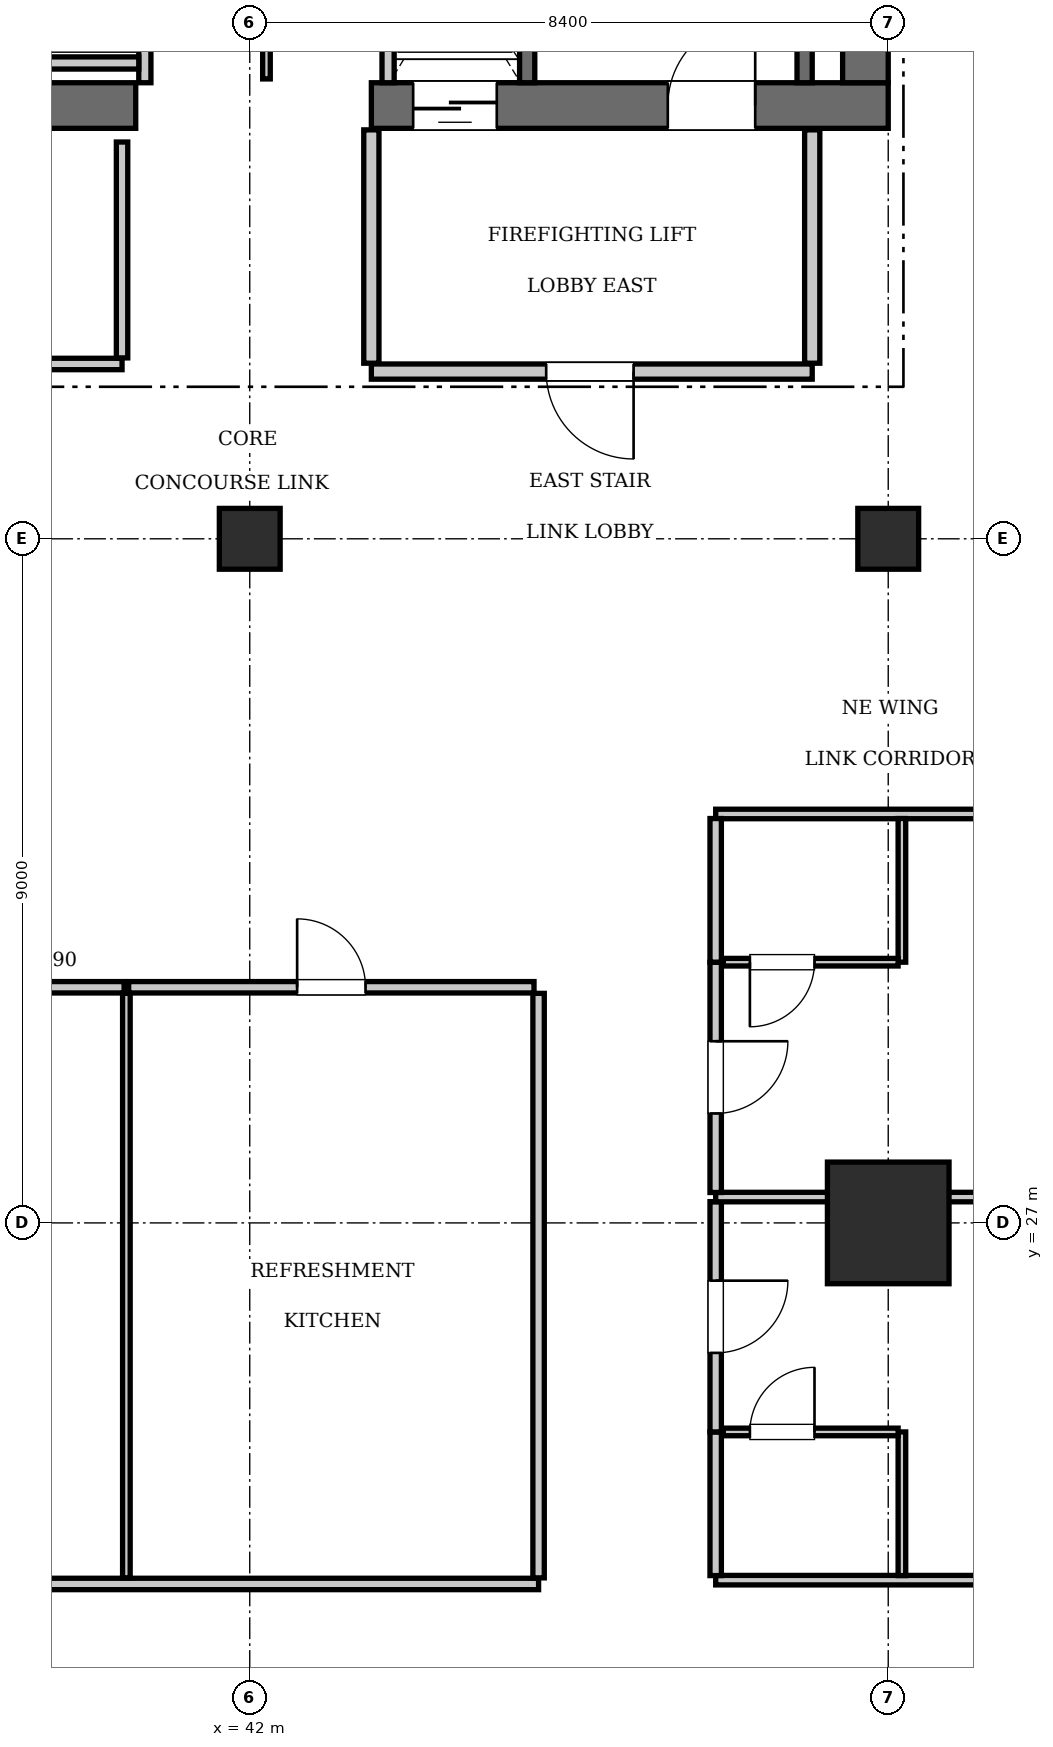
"""IFC4 building model, lengths in metres.
Left out: names, types, materials, properties, quantities, classifications, styles, units other than length and angle.
Written with IfcOpenShell. Run it as: python <this file> out.ifc"""

import sys

from ifc_helpers import new_model, si_unit, direction, frame, frame_2d, origin, origin_2d, place, context, subcontext, project, spatial, rectangle, extrude, element, fill, save


model = new_model("IFC4")
c1 = context("Model", 3, precision=1e-05, world=origin(), true_north=direction((0.0, 1.0)))
c2 = subcontext(c1, "Body", "Model", "MODEL_VIEW")
j1 = project(units=[si_unit("LENGTHUNIT", "METRE"), si_unit("PLANEANGLEUNIT", "RADIAN")], contexts=[c1])
p1 = place(None, origin())
s1 = spatial("IfcSite", under=j1, at=p1, CompositionType="ELEMENT")
p2 = place(p1, origin())
s2 = spatial("IfcBuilding", under=s1, at=p2, CompositionType="ELEMENT")
p3 = place(p2, frame((0.0, 0.0, 289.45)))
s3 = spatial("IfcBuildingStorey", under=s2, at=p3, CompositionType="ELEMENT", Elevation=289.45)
p4 = place(p3, frame((50.4, 27.0, 0.0), z_axis=(0.0, 0.0, 1.0), x_axis=(1.0, 0.0, 0.0)))
e1 = element("IfcColumn", 1, at=p4, inside=s3, PredefinedType="COLUMN", context=c2, shape_type="SweptSolid", body=[
    extrude(rectangle(XDim=1.6, YDim=1.6, at=origin_2d()), origin(), (0.0, 0.0, 1.0), 3.85),
])
p5 = place(p3, frame((35.1, 41.7, 0.0), z_axis=(0.0, 0.0, 1.0), x_axis=(1.0, 0.0, 0.0)))
e2 = element("IfcWall", 2, at=p5, inside=s3, PredefinedType="SHEAR", context=c2, shape_type="SweptSolid", body=[
    extrude(rectangle(XDim=5.4, YDim=0.6, at=frame_2d((2.7, 0.0))), origin(), (0.0, 0.0, 1.0), 3.85),
])
p6 = place(p3, frame((43.6, 41.7, 0.0), z_axis=(0.0, 0.0, 1.0), x_axis=(1.0, 0.0, 0.0)))
e3 = element("IfcWall", 3, at=p6, inside=s3, PredefinedType="SHEAR", context=c2, shape_type="SweptSolid", body=[
    extrude(rectangle(XDim=6.8, YDim=0.6, at=frame_2d((3.4, 0.0))), origin(), (0.0, 0.0, 1.0), 3.85),
])
p7 = place(p6, frame((3.9, 0.0, 0.0)))
e4 = element("IfcOpeningElement", 4, at=p7, cuts=e3, PredefinedType="OPENING", context=c2, shape_type="SweptSolid", body=[
    extrude(rectangle(XDim=1.15, YDim=2.15, at=frame_2d((0.575, 1.075))), frame((0.0, 0.31, 0.0), z_axis=(0.0, -1.0, 0.0), x_axis=(1.0, 0.0, 0.0)), (0.0, 0.0, 1.0), 0.62),
])
p8 = place(p6, frame((0.55, 0.0, 0.0)))
e5 = element("IfcOpeningElement", 5, at=p8, cuts=e3, PredefinedType="OPENING", context=c2, shape_type="SweptSolid", body=[
    extrude(rectangle(XDim=1.1, YDim=2.2, at=frame_2d((0.55, 1.1))), frame((0.0, 0.31, 0.0), z_axis=(0.0, -1.0, 0.0), x_axis=(1.0, 0.0, 0.0)), (0.0, 0.0, 1.0), 0.62),
])
p9 = place(p3, frame((50.1, 42.0, 0.0), z_axis=(0.0, 0.0, 1.0), x_axis=(0.0, 1.0, 0.0)))
e6 = element("IfcWall", 6, at=p9, inside=s3, PredefinedType="SHEAR", context=c2, shape_type="SweptSolid", body=[
    extrude(rectangle(XDim=2.2, YDim=0.6, at=frame_2d((1.1, 0.0))), origin(), (0.0, 0.0, 1.0), 3.85),
])
for number, where, z_axis, x_axis in (
    (7, (42.0, 36.0, 0.0), (0.0, 0.0, 1.0), (1.0, 0.0, 0.0)),
    (8, (50.4, 36.0, 0.0), (0.0, 0.0, 1.0), (1.0, 0.0, 0.0)),
):
    element("IfcColumn", number, at=place(p3, frame(where, z_axis=z_axis, x_axis=x_axis)), inside=s3, PredefinedType="COLUMN", context=c2, shape_type="SweptSolid", body=[
        extrude(rectangle(XDim=0.8, YDim=0.8, at=origin_2d()), origin(), (0.0, 0.0, 1.0), 3.85),
    ])
p10 = place(p3, frame((45.65, 42.0, 0.0), z_axis=(0.0, 0.0, 1.0), x_axis=(0.0, 1.0, 0.0)))
e9 = element("IfcWall", 9, at=p10, inside=s3, PredefinedType="SOLIDWALL", context=c2, shape_type="SweptSolid", body=[
    extrude(rectangle(XDim=9.15, YDim=0.2, at=frame_2d((4.575, 0.0))), origin(), (0.0, 0.0, 1.0), 3.61),
])
p11 = place(p3, frame((49.3, 42.0, 0.0), z_axis=(0.0, 0.0, 1.0), x_axis=(0.0, 1.0, 0.0)))
e10 = element("IfcWall", 10, at=p11, inside=s3, PredefinedType="SOLIDWALL", context=c2, shape_type="SweptSolid", body=[
    extrude(rectangle(XDim=9.12, YDim=0.2, at=frame_2d((4.56, 0.0))), origin(), (0.0, 0.0, 1.0), 3.61),
])
p12 = place(p3, frame((43.82, 42.0, 0.0), z_axis=(0.0, 0.0, 1.0), x_axis=(0.0, 1.0, 0.0)))
e11 = element("IfcWall", 11, at=p12, inside=s3, PredefinedType="SOLIDWALL", context=c2, shape_type="SweptSolid", body=[
    extrude(rectangle(XDim=2.74, YDim=0.16, at=frame_2d((1.37, 0.0))), origin(), (0.0, 0.0, 1.0), 3.61),
])
p13 = place(p3, frame((40.62, 42.0, 0.0), z_axis=(0.0, 0.0, 1.0), x_axis=(0.0, 1.0, 0.0)))
e12 = element("IfcWall", 12, at=p13, inside=s3, PredefinedType="SOLIDWALL", context=c2, shape_type="SweptSolid", body=[
    extrude(rectangle(XDim=2.35, YDim=0.16, at=frame_2d((1.175, 0.0))), origin(), (0.0, 0.0, 1.0), 3.61),
])
p14 = place(p3, frame((35.52, 42.26, 0.0), z_axis=(0.0, 0.0, 1.0), x_axis=(1.0, 0.0, 0.0)))
e13 = element("IfcWall", 13, at=p14, inside=s3, PredefinedType="SOLIDWALL", context=c2, shape_type="SweptSolid", body=[
    extrude(rectangle(XDim=5.02, YDim=0.16, at=frame_2d((2.51, 0.0))), origin(), (0.0, 0.0, 1.0), 3.61),
])
p15 = place(p3, frame((43.6, 38.2, 0.0), z_axis=(0.0, 0.0, 1.0), x_axis=(1.0, 0.0, 0.0)))
e14 = element("IfcWall", 14, at=p15, inside=s3, PredefinedType="PARTITIONING", context=c2, shape_type="SweptSolid", body=[
    extrude(rectangle(XDim=5.8, YDim=0.2, at=frame_2d((2.9, 0.0))), origin(), (0.0, 0.0, 1.0), 3.61),
])
p16 = place(p15, frame((2.3, 0.0, 0.0)))
e15 = element("IfcOpeningElement", 15, at=p16, cuts=e14, PredefinedType="OPENING", context=c2, shape_type="SweptSolid", body=[
    extrude(rectangle(XDim=1.15, YDim=2.15, at=frame_2d((0.575, 1.075))), frame((0.0, 0.11, 0.0), z_axis=(0.0, -1.0, 0.0), x_axis=(1.0, 0.0, 0.0)), (0.0, 0.0, 1.0), 0.22),
])
for number, where, z_axis, x_axis in (
    (16, (43.6, 38.31, 0.0), (0.0, 0.0, 1.0), (0.0, 1.0, 0.0)),
    (17, (49.4, 38.31, 0.0), (0.0, 0.0, 1.0), (0.0, 1.0, 0.0)),
):
    element("IfcWall", number, at=place(p3, frame(where, z_axis=z_axis, x_axis=x_axis)), inside=s3, PredefinedType="PARTITIONING", context=c2, shape_type="SweptSolid", body=[
        extrude(rectangle(XDim=3.07, YDim=0.2, at=frame_2d((1.535, 0.0))), origin(), (0.0, 0.0, 1.0), 3.61),
    ])
p17 = place(p3, frame((42.22, 42.05, 0.0), z_axis=(0.0, 0.0, 1.0), x_axis=(0.0, 1.0, 0.0)))
e18 = element("IfcWall", 18, at=p17, inside=s3, PredefinedType="PARTITIONING", context=c2, shape_type="SweptSolid", body=[
    extrude(rectangle(XDim=2.91, YDim=0.1, at=frame_2d((1.455, 0.0))), origin(), (0.0, 0.0, 1.0), 3.61),
])
p18 = place(p17, frame((0.65, 0.0, 0.0)))
e19 = element("IfcOpeningElement", 19, at=p18, cuts=e18, PredefinedType="OPENING", context=c2, shape_type="SweptSolid", body=[
    extrude(rectangle(XDim=0.8, YDim=2.05, at=frame_2d((0.4, 1.025))), frame((0.0, 0.06, 0.0), z_axis=(0.0, -1.0, 0.0), x_axis=(1.0, 0.0, 0.0)), (0.0, 0.0, 1.0), 0.12),
])
p19 = place(p3, frame((37.38, 38.3, 0.0), z_axis=(0.0, 0.0, 1.0), x_axis=(1.0, 0.0, 0.0)))
e20 = element("IfcWall", 20, at=p19, inside=s3, PredefinedType="PARTITIONING", context=c2, shape_type="SweptSolid", body=[
    extrude(rectangle(XDim=2.94, YDim=0.15, at=frame_2d((1.47, 0.0))), origin(), (0.0, 0.0, 1.0), 3.61),
])
p20 = place(p19, frame((1.0, 0.0, 0.0)))
e21 = element("IfcOpeningElement", 21, at=p20, cuts=e20, PredefinedType="OPENING", context=c2, shape_type="SweptSolid", body=[
    extrude(rectangle(XDim=0.8, YDim=2.05, at=frame_2d((0.4, 1.025))), frame((0.0, 0.085, 0.0), z_axis=(0.0, -1.0, 0.0), x_axis=(1.0, 0.0, 0.0)), (0.0, 0.0, 1.0), 0.17),
])
p21 = place(p3, frame((40.32, 38.38, 0.0), z_axis=(0.0, 0.0, 1.0), x_axis=(0.0, 1.0, 0.0)))
e22 = element("IfcWall", 22, at=p21, inside=s3, PredefinedType="PARTITIONING", context=c2, shape_type="SweptSolid", body=[
    extrude(rectangle(XDim=2.84, YDim=0.15, at=frame_2d((1.42, 0.0))), origin(), (0.0, 0.0, 1.0), 3.61),
])
p22 = place(p3, frame((29.85, 22.25, 0.0), z_axis=(0.0, 0.0, 1.0), x_axis=(1.0, 0.0, 0.0)))
e23 = element("IfcWall", 23, at=p22, inside=s3, PredefinedType="PARTITIONING", context=c2, shape_type="SweptSolid", body=[
    extrude(rectangle(XDim=15.95, YDim=0.15, at=frame_2d((7.975, 0.0))), origin(), (0.0, 0.0, 1.0), 3.61),
])
p23 = place(p3, frame((45.8, 22.33, 0.0), z_axis=(0.0, 0.0, 1.0), x_axis=(0.0, 1.0, 0.0)))
e24 = element("IfcWall", 24, at=p23, inside=s3, PredefinedType="PARTITIONING", context=c2, shape_type="SweptSolid", body=[
    extrude(rectangle(XDim=7.69, YDim=0.15, at=frame_2d((3.845, 0.0))), origin(), (0.0, 0.0, 1.0), 3.61),
])
p24 = place(p3, frame((35.941, 30.1, 0.0), z_axis=(0.0, 0.0, 1.0), x_axis=(1.0, 0.0, 0.0)))
e25 = element("IfcWall", 25, at=p24, inside=s3, PredefinedType="PARTITIONING", context=c2, shape_type="SweptSolid", body=[
    extrude(rectangle(XDim=4.406, YDim=0.15, at=frame_2d((2.203, 0.0))), origin(), (0.0, 0.0, 1.0), 3.61),
])
p25 = place(p24, frame((1.753, 0.0, 0.0)))
e26 = element("IfcOpeningElement", 26, at=p25, cuts=e25, PredefinedType="OPENING", context=c2, shape_type="SweptSolid", body=[
    extrude(rectangle(XDim=0.9, YDim=2.1, at=frame_2d((0.45, 1.05))), frame((0.0, 0.085, 0.0), z_axis=(0.0, -1.0, 0.0), x_axis=(1.0, 0.0, 0.0)), (0.0, 0.0, 1.0), 0.17),
])
p26 = place(p3, frame((40.377, 22.33, 0.0), z_axis=(0.0, 0.0, 1.0), x_axis=(0.0, 1.0, 0.0)))
e27 = element("IfcWall", 27, at=p26, inside=s3, PredefinedType="PARTITIONING", context=c2, shape_type="SweptSolid", body=[
    extrude(rectangle(XDim=7.69, YDim=0.1, at=frame_2d((3.845, 0.0))), origin(), (0.0, 0.0, 1.0), 3.61),
])
p27 = place(p3, frame((40.407, 30.1, 0.0), z_axis=(0.0, 0.0, 1.0), x_axis=(1.0, 0.0, 0.0)))
e28 = element("IfcWall", 28, at=p27, inside=s3, PredefinedType="PARTITIONING", context=c2, shape_type="SweptSolid", body=[
    extrude(rectangle(XDim=5.333, YDim=0.15, at=frame_2d((2.667, 0.0))), origin(), (0.0, 0.0, 1.0), 3.61),
])
p28 = place(p27, frame((2.217, 0.0, 0.0)))
e29 = element("IfcOpeningElement", 29, at=p28, cuts=e28, PredefinedType="OPENING", context=c2, shape_type="SweptSolid", body=[
    extrude(rectangle(XDim=0.9, YDim=2.1, at=frame_2d((0.45, 1.05))), frame((0.0, 0.085, 0.0), z_axis=(0.0, -1.0, 0.0), x_axis=(1.0, 0.0, 0.0)), (0.0, 0.0, 1.0), 0.17),
])
for number, where, z_axis, x_axis in (
    (30, (48.13, 22.3, 0.0), (0.0, 0.0, 1.0), (1.0, 0.0, 0.0)),
    (31, (48.13, 32.38, 0.0), (0.0, 0.0, 1.0), (1.0, 0.0, 0.0)),
):
    element("IfcWall", number, at=place(p3, frame(where, z_axis=z_axis, x_axis=x_axis)), inside=s3, PredefinedType="PARTITIONING", context=c2, shape_type="SweptSolid", body=[
        extrude(rectangle(XDim=11.97, YDim=0.125, at=frame_2d((5.985, 0.0))), origin(), (0.0, 0.0, 1.0), 3.61),
    ])
p29 = place(p3, frame((48.13, 22.36, 0.0), z_axis=(0.0, 0.0, 1.0), x_axis=(0.0, 1.0, 0.0)))
e32 = element("IfcWall", 32, at=p29, inside=s3, PredefinedType="PARTITIONING", context=c2, shape_type="SweptSolid", body=[
    extrude(rectangle(XDim=1.89, YDim=0.15, at=frame_2d((0.945, 0.0))), origin(), (0.0, 0.0, 1.0), 3.61),
])
p30 = place(p3, frame((48.13, 24.25, 0.0), z_axis=(0.0, 0.0, 1.0), x_axis=(0.0, 1.0, 0.0)))
e33 = element("IfcWall", 33, at=p30, inside=s3, PredefinedType="PARTITIONING", context=c2, shape_type="SweptSolid", body=[
    extrude(rectangle(XDim=3.03, YDim=0.15, at=frame_2d((1.515, 0.0))), origin(), (0.0, 0.0, 1.0), 3.61),
])
p31 = place(p30, frame((1.04, 0.0, 0.0)))
e34 = element("IfcOpeningElement", 34, at=p31, cuts=e33, PredefinedType="OPENING", context=c2, shape_type="SweptSolid", body=[
    extrude(rectangle(XDim=0.95, YDim=2.15, at=frame_2d((0.475, 1.075))), frame((0.0, 0.085, 0.0), z_axis=(0.0, -1.0, 0.0), x_axis=(1.0, 0.0, 0.0)), (0.0, 0.0, 1.0), 0.17),
])
p32 = place(p3, frame((50.58, 22.36, 0.0), z_axis=(0.0, 0.0, 1.0), x_axis=(0.0, 1.0, 0.0)))
e35 = element("IfcWall", 35, at=p32, inside=s3, PredefinedType="PARTITIONING", context=c2, shape_type="SweptSolid", body=[
    extrude(rectangle(XDim=1.89, YDim=0.1, at=frame_2d((0.945, 0.0))), origin(), (0.0, 0.0, 1.0), 3.61),
])
p33 = place(p3, frame((48.23, 24.25, 0.0), z_axis=(0.0, 0.0, 1.0), x_axis=(1.0, 0.0, 0.0)))
e36 = element("IfcWall", 36, at=p33, inside=s3, PredefinedType="PARTITIONING", context=c2, shape_type="SweptSolid", body=[
    extrude(rectangle(XDim=2.3, YDim=0.1, at=frame_2d((1.15, 0.0))), origin(), (0.0, 0.0, 1.0), 3.61),
])
p34 = place(p33, frame((0.35, 0.0, 0.0)))
e37 = element("IfcOpeningElement", 37, at=p34, cuts=e36, PredefinedType="OPENING", context=c2, shape_type="SweptSolid", body=[
    extrude(rectangle(XDim=0.85, YDim=2.1, at=frame_2d((0.425, 1.05))), frame((0.0, 0.06, 0.0), z_axis=(0.0, -1.0, 0.0), x_axis=(1.0, 0.0, 0.0)), (0.0, 0.0, 1.0), 0.12),
])
p35 = place(p3, frame((48.13, 27.34, 0.0), z_axis=(0.0, 0.0, 1.0), x_axis=(1.0, 0.0, 0.0)))
e38 = element("IfcWall", 38, at=p35, inside=s3, PredefinedType="PARTITIONING", context=c2, shape_type="SweptSolid", body=[
    extrude(rectangle(XDim=11.97, YDim=0.125, at=frame_2d((5.985, 0.0))), origin(), (0.0, 0.0, 1.0), 3.61),
])
p36 = place(p3, frame((48.13, 27.4, 0.0), z_axis=(0.0, 0.0, 1.0), x_axis=(0.0, 1.0, 0.0)))
e39 = element("IfcWall", 39, at=p36, inside=s3, PredefinedType="PARTITIONING", context=c2, shape_type="SweptSolid", body=[
    extrude(rectangle(XDim=3.03, YDim=0.15, at=frame_2d((1.515, 0.0))), origin(), (0.0, 0.0, 1.0), 3.61),
])
p37 = place(p36, frame((1.04, 0.0, 0.0)))
e40 = element("IfcOpeningElement", 40, at=p37, cuts=e39, PredefinedType="OPENING", context=c2, shape_type="SweptSolid", body=[
    extrude(rectangle(XDim=0.95, YDim=2.15, at=frame_2d((0.475, 1.075))), frame((0.0, 0.085, 0.0), z_axis=(0.0, -1.0, 0.0), x_axis=(1.0, 0.0, 0.0)), (0.0, 0.0, 1.0), 0.17),
])
p38 = place(p3, frame((48.13, 30.43, 0.0), z_axis=(0.0, 0.0, 1.0), x_axis=(0.0, 1.0, 0.0)))
e41 = element("IfcWall", 41, at=p38, inside=s3, PredefinedType="PARTITIONING", context=c2, shape_type="SweptSolid", body=[
    extrude(rectangle(XDim=1.89, YDim=0.15, at=frame_2d((0.945, 0.0))), origin(), (0.0, 0.0, 1.0), 3.61),
])
p39 = place(p3, frame((50.58, 30.43, 0.0), z_axis=(0.0, 0.0, 1.0), x_axis=(0.0, 1.0, 0.0)))
e42 = element("IfcWall", 42, at=p39, inside=s3, PredefinedType="PARTITIONING", context=c2, shape_type="SweptSolid", body=[
    extrude(rectangle(XDim=1.89, YDim=0.1, at=frame_2d((0.945, 0.0))), origin(), (0.0, 0.0, 1.0), 3.61),
])
p40 = place(p3, frame((48.23, 30.43, 0.0), z_axis=(0.0, 0.0, 1.0), x_axis=(1.0, 0.0, 0.0)))
e43 = element("IfcWall", 43, at=p40, inside=s3, PredefinedType="PARTITIONING", context=c2, shape_type="SweptSolid", body=[
    extrude(rectangle(XDim=2.3, YDim=0.1, at=frame_2d((1.15, 0.0))), origin(), (0.0, 0.0, 1.0), 3.61),
])
p41 = place(p40, frame((0.35, 0.0, 0.0)))
e44 = element("IfcOpeningElement", 44, at=p41, cuts=e43, PredefinedType="OPENING", context=c2, shape_type="SweptSolid", body=[
    extrude(rectangle(XDim=0.85, YDim=2.1, at=frame_2d((0.425, 1.05))), frame((0.0, 0.06, 0.0), z_axis=(0.0, -1.0, 0.0), x_axis=(1.0, 0.0, 0.0)), (0.0, 0.0, 1.0), 0.12),
])
p42 = place(p7, origin())
e45 = element("IfcDoor", 45, at=p42, inside=s3, OperationType="SINGLE_SWING_RIGHT", PredefinedType="DOOR", context=c2, shape_type="SweptSolid", body=[
    extrude(rectangle(XDim=1.15, YDim=2.15, at=frame_2d((0.575, 1.075))), frame((0.0, 0.025, 0.0), z_axis=(0.0, -1.0, 0.0), x_axis=(1.0, 0.0, 0.0)), (0.0, 0.0, 1.0), 0.05),
])
fill(e4, e45)
p43 = place(p8, frame((1.1, 0.0, 0.0), z_axis=(0.0, 0.0, 1.0), x_axis=(-1.0, 0.0, 0.0)))
e46 = element("IfcDoor", 46, at=p43, inside=s3, OperationType="SLIDING_TO_LEFT", PredefinedType="DOOR", context=c2, shape_type="SweptSolid", body=[
    extrude(rectangle(XDim=1.1, YDim=2.2, at=frame_2d((0.55, 1.1))), frame((0.0, 0.025, 0.0), z_axis=(0.0, -1.0, 0.0), x_axis=(1.0, 0.0, 0.0)), (0.0, 0.0, 1.0), 0.05),
])
fill(e5, e46)
p44 = place(p16, frame((1.15, 0.0, 0.0), z_axis=(0.0, 0.0, 1.0), x_axis=(-1.0, 0.0, 0.0)))
e47 = element("IfcDoor", 47, at=p44, inside=s3, OperationType="SINGLE_SWING_LEFT", PredefinedType="DOOR", context=c2, shape_type="SweptSolid", body=[
    extrude(rectangle(XDim=1.15, YDim=2.15, at=frame_2d((0.575, 1.075))), frame((0.0, 0.025, 0.0), z_axis=(0.0, -1.0, 0.0), x_axis=(1.0, 0.0, 0.0)), (0.0, 0.0, 1.0), 0.05),
])
fill(e15, e47)
p45 = place(p28, origin())
e48 = element("IfcDoor", 48, at=p45, inside=s3, OperationType="SINGLE_SWING_LEFT", PredefinedType="DOOR", context=c2, shape_type="SweptSolid", body=[
    extrude(rectangle(XDim=0.9, YDim=2.1, at=frame_2d((0.45, 1.05))), frame((0.0, 0.025, 0.0), z_axis=(0.0, -1.0, 0.0), x_axis=(1.0, 0.0, 0.0)), (0.0, 0.0, 1.0), 0.05),
])
fill(e29, e48)
p46 = place(p34, origin())
e49 = element("IfcDoor", 49, at=p46, inside=s3, OperationType="SINGLE_SWING_RIGHT", PredefinedType="DOOR", context=c2, shape_type="SweptSolid", body=[
    extrude(rectangle(XDim=0.85, YDim=2.1, at=frame_2d((0.425, 1.05))), frame((0.0, 0.025, 0.0), z_axis=(0.0, -1.0, 0.0), x_axis=(1.0, 0.0, 0.0)), (0.0, 0.0, 1.0), 0.05),
])
fill(e37, e49)
p47 = place(p31, frame((0.95, 0.0, 0.0), z_axis=(0.0, 0.0, 1.0), x_axis=(-1.0, 0.0, 0.0)))
e50 = element("IfcDoor", 50, at=p47, inside=s3, OperationType="SINGLE_SWING_LEFT", PredefinedType="DOOR", context=c2, shape_type="SweptSolid", body=[
    extrude(rectangle(XDim=0.95, YDim=2.15, at=frame_2d((0.475, 1.075))), frame((0.0, 0.025, 0.0), z_axis=(0.0, -1.0, 0.0), x_axis=(1.0, 0.0, 0.0)), (0.0, 0.0, 1.0), 0.05),
])
fill(e34, e50)
p48 = place(p41, frame((0.85, 0.0, 0.0), z_axis=(0.0, 0.0, 1.0), x_axis=(-1.0, 0.0, 0.0)))
e51 = element("IfcDoor", 51, at=p48, inside=s3, OperationType="SINGLE_SWING_RIGHT", PredefinedType="DOOR", context=c2, shape_type="SweptSolid", body=[
    extrude(rectangle(XDim=0.85, YDim=2.1, at=frame_2d((0.425, 1.05))), frame((0.0, 0.025, 0.0), z_axis=(0.0, -1.0, 0.0), x_axis=(1.0, 0.0, 0.0)), (0.0, 0.0, 1.0), 0.05),
])
fill(e44, e51)
p49 = place(p37, frame((0.95, 0.0, 0.0), z_axis=(0.0, 0.0, 1.0), x_axis=(-1.0, 0.0, 0.0)))
e52 = element("IfcDoor", 52, at=p49, inside=s3, OperationType="SINGLE_SWING_LEFT", PredefinedType="DOOR", context=c2, shape_type="SweptSolid", body=[
    extrude(rectangle(XDim=0.95, YDim=2.15, at=frame_2d((0.475, 1.075))), frame((0.0, 0.025, 0.0), z_axis=(0.0, -1.0, 0.0), x_axis=(1.0, 0.0, 0.0)), (0.0, 0.0, 1.0), 0.05),
])
fill(e40, e52)
save(model, sys.argv[1])
